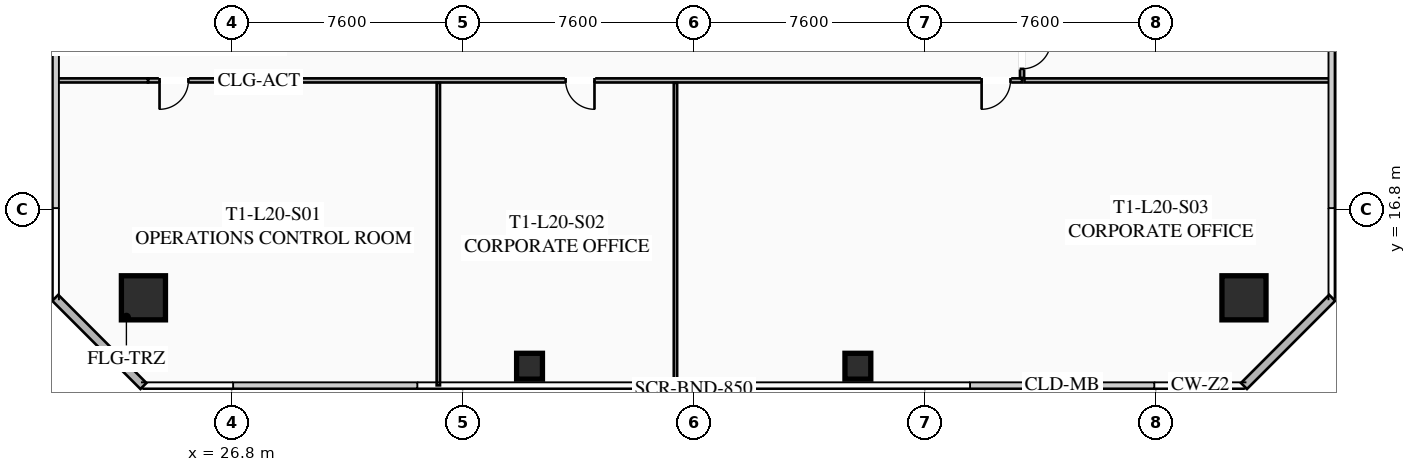
"""IFC4 building model, lengths in metres.
Left out: names, types, materials, properties, quantities, classifications, styles, units other than length and angle.
Written with IfcOpenShell. Run it as: python <this file> out.ifc"""

import sys

from ifc_helpers import new_model, si_unit, direction, frame, frame_2d, origin, origin_2d, place, context, subcontext, project, spatial, rectangle, hollow_rectangle, extrude, element, fill, save


model = new_model("IFC4")
c1 = context("Model", 3, precision=1e-05, world=origin(), true_north=direction((0.0, 1.0)))
c2 = subcontext(c1, "Body", "Model", "MODEL_VIEW")
j1 = project(units=[si_unit("LENGTHUNIT", "METRE"), si_unit("PLANEANGLEUNIT", "RADIAN")], contexts=[c1])
p1 = place(None, origin())
s1 = spatial("IfcSite", under=j1, at=p1, CompositionType="ELEMENT")
p2 = place(p1, origin())
s2 = spatial("IfcBuilding", under=s1, at=p2, CompositionType="ELEMENT")
p3 = place(p2, frame((0.0, 0.0, 77.85)))
s3 = spatial("IfcBuildingStorey", under=s2, at=p3, CompositionType="ELEMENT", Elevation=77.85)
for number, where, z_axis, x_axis in (
    (1, (23.9, 13.9, 0.0), (0.0, 0.0, 1.0), (1.0, 0.0, 0.0)),
    (2, (60.1, 13.9, 0.0), (0.0, 0.0, 1.0), (1.0, 0.0, 0.0)),
):
    element("IfcColumn", number, at=place(p3, frame(where, z_axis=z_axis, x_axis=x_axis)), inside=s3, PredefinedType="COLUMN", context=c2, shape_type="SweptSolid", body=[
        extrude(hollow_rectangle(XDim=1.45, YDim=1.45, WallThickness=0.055, at=origin_2d()), origin(), (0.0, 0.0, 1.0), 3.35),
    ])
for number, where, z_axis, x_axis in (
    (3, (36.6, 11.65, 0.0), (0.0, 0.0, 1.0), (1.0, 0.0, 0.0)),
    (4, (47.4, 11.65, 0.0), (0.0, 0.0, 1.0), (1.0, 0.0, 0.0)),
):
    element("IfcColumn", number, at=place(p3, frame(where, z_axis=z_axis, x_axis=x_axis)), inside=s3, PredefinedType="COLUMN", context=c2, shape_type="SweptSolid", body=[
        extrude(hollow_rectangle(XDim=0.85, YDim=0.85, WallThickness=0.035, at=origin_2d()), origin(), (0.0, 0.0, 1.0), 3.35),
    ])
for number, where, z_axis, x_axis in (
    (5, (23.9, 11.0, 0.0), (0.0, 0.0, 1.0), (-0.707, 0.707, 0.0)),
    (6, (63.0, 13.9, 0.0), (0.0, 0.0, 1.0), (-0.707, -0.707, 0.0)),
):
    element("IfcWall", number, at=place(p3, frame(where, z_axis=z_axis, x_axis=x_axis)), inside=s3, PredefinedType="SOLIDWALL", context=c2, shape_type="SweptSolid", body=[
        extrude(rectangle(XDim=4.101, YDim=0.28, at=frame_2d((2.051, 0.0))), origin(), (0.0, 0.0, 1.0), 3.35),
    ])
p4 = place(p3, frame((52.8, 21.05, 0.0), z_axis=(0.0, 0.0, 1.0), x_axis=(-1.0, 0.0, 0.0)))
e7 = element("IfcWall", 7, at=p4, inside=s3, PredefinedType="PARTITIONING", context=c2, shape_type="SweptSolid", body=[
    extrude(rectangle(XDim=28.75, YDim=0.135, at=frame_2d((14.375, 0.0))), origin(), (0.0, 0.0, 1.0), 2.703),
])
p5 = place(p4, frame((27.42, 0.0, 0.0)))
e8 = element("IfcOpeningElement", 8, at=p5, cuts=e7, PredefinedType="OPENING", context=c2, shape_type="SweptSolid", body=[
    extrude(rectangle(XDim=0.95, YDim=2.05, at=frame_2d((0.475, 1.025))), frame((0.0, 0.077, 0.0), z_axis=(0.0, -1.0, 0.0), x_axis=(1.0, 0.0, 0.0)), (0.0, 0.0, 1.0), 0.155),
])
p6 = place(p4, frame((14.064, 0.0, 0.0)))
e9 = element("IfcOpeningElement", 9, at=p6, cuts=e7, PredefinedType="OPENING", context=c2, shape_type="SweptSolid", body=[
    extrude(rectangle(XDim=0.95, YDim=2.05, at=frame_2d((0.475, 1.025))), frame((0.0, 0.077, 0.0), z_axis=(0.0, -1.0, 0.0), x_axis=(1.0, 0.0, 0.0)), (0.0, 0.0, 1.0), 0.155),
])
p7 = place(p4, frame((0.38, 0.0, 0.0)))
e10 = element("IfcOpeningElement", 10, at=p7, cuts=e7, PredefinedType="OPENING", context=c2, shape_type="SweptSolid", body=[
    extrude(rectangle(XDim=0.95, YDim=2.05, at=frame_2d((0.475, 1.025))), frame((0.0, 0.077, 0.0), z_axis=(0.0, -1.0, 0.0), x_axis=(1.0, 0.0, 0.0)), (0.0, 0.0, 1.0), 0.155),
])
p8 = place(p3, frame((21.02, 21.05, 0.0), z_axis=(0.0, 0.0, 1.0), x_axis=(1.0, 0.0, 0.0)))
e11 = element("IfcWall", 11, at=p8, inside=s3, PredefinedType="PARTITIONING", context=c2, shape_type="SweptSolid", body=[
    extrude(rectangle(XDim=3.03, YDim=0.135, at=frame_2d((1.515, 0.0))), origin(), (0.0, 0.0, 1.0), 2.703),
])
for number, where, z_axis, x_axis in (
    (12, (33.6, 11.02, 0.0), (0.0, 0.0, 1.0), (0.0, 1.0, 0.0)),
    (13, (41.4, 11.02, 0.0), (0.0, 0.0, 1.0), (0.0, 1.0, 0.0)),
):
    element("IfcWall", number, at=place(p3, frame(where, z_axis=z_axis, x_axis=x_axis)), inside=s3, PredefinedType="PARTITIONING", context=c2, shape_type="SweptSolid", body=[
        extrude(rectangle(XDim=9.95, YDim=0.11, at=frame_2d((4.975, 0.0))), origin(), (0.0, 0.0, 1.0), 2.703),
    ])
p9 = place(p3, frame((52.8, 41.49, 0.0), z_axis=(0.0, 0.0, 1.0), x_axis=(0.0, -1.0, 0.0)))
e14 = element("IfcWall", 14, at=p9, inside=s3, PredefinedType="PARTITIONING", context=c2, shape_type="SweptSolid", body=[
    extrude(rectangle(XDim=20.36, YDim=0.135, at=frame_2d((10.18, 0.0))), origin(), (0.0, 0.0, 1.0), 2.703),
])
p10 = place(p9, frame((19.11, 0.0, 0.0)))
e15 = element("IfcOpeningElement", 15, at=p10, cuts=e14, PredefinedType="OPENING", context=c2, shape_type="SweptSolid", body=[
    extrude(rectangle(XDim=0.95, YDim=2.05, at=frame_2d((0.475, 1.025))), frame((0.0, 0.077, 0.0), z_axis=(0.0, -1.0, 0.0), x_axis=(1.0, 0.0, 0.0)), (0.0, 0.0, 1.0), 0.155),
])
p11 = place(p3, frame((52.88, 21.05, 0.0), z_axis=(0.0, 0.0, 1.0), x_axis=(1.0, 0.0, 0.0)))
e16 = element("IfcWall", 16, at=p11, inside=s3, PredefinedType="PARTITIONING", context=c2, shape_type="SweptSolid", body=[
    extrude(rectangle(XDim=10.1, YDim=0.135, at=frame_2d((5.05, 0.0))), origin(), (0.0, 0.0, 1.0), 2.703),
])
p12 = place(p5, origin())
e17 = element("IfcDoor", 17, at=p12, inside=s3, OperationType="SINGLE_SWING_RIGHT", PredefinedType="DOOR", context=c2, shape_type="SweptSolid", body=[
    extrude(rectangle(XDim=0.95, YDim=2.05, at=frame_2d((0.475, 1.025))), frame((0.0, 0.025, 0.0), z_axis=(0.0, -1.0, 0.0), x_axis=(1.0, 0.0, 0.0)), (0.0, 0.0, 1.0), 0.05),
])
fill(e8, e17)
p13 = place(p6, origin())
e18 = element("IfcDoor", 18, at=p13, inside=s3, OperationType="SINGLE_SWING_LEFT", PredefinedType="DOOR", context=c2, shape_type="SweptSolid", body=[
    extrude(rectangle(XDim=0.95, YDim=2.05, at=frame_2d((0.475, 1.025))), frame((0.0, 0.025, 0.0), z_axis=(0.0, -1.0, 0.0), x_axis=(1.0, 0.0, 0.0)), (0.0, 0.0, 1.0), 0.05),
])
fill(e9, e18)
p14 = place(p7, origin())
e19 = element("IfcDoor", 19, at=p14, inside=s3, OperationType="SINGLE_SWING_RIGHT", PredefinedType="DOOR", context=c2, shape_type="SweptSolid", body=[
    extrude(rectangle(XDim=0.95, YDim=2.05, at=frame_2d((0.475, 1.025))), frame((0.0, 0.025, 0.0), z_axis=(0.0, -1.0, 0.0), x_axis=(1.0, 0.0, 0.0)), (0.0, 0.0, 1.0), 0.05),
])
fill(e10, e19)
p15 = place(p10, origin())
e20 = element("IfcDoor", 20, at=p15, inside=s3, OperationType="SINGLE_SWING_LEFT", PredefinedType="DOOR", context=c2, shape_type="SweptSolid", body=[
    extrude(rectangle(XDim=0.95, YDim=2.05, at=frame_2d((0.475, 1.025))), frame((0.0, 0.025, 0.0), z_axis=(0.0, -1.0, 0.0), x_axis=(1.0, 0.0, 0.0)), (0.0, 0.0, 1.0), 0.05),
])
fill(e15, e20)
save(model, sys.argv[1])
